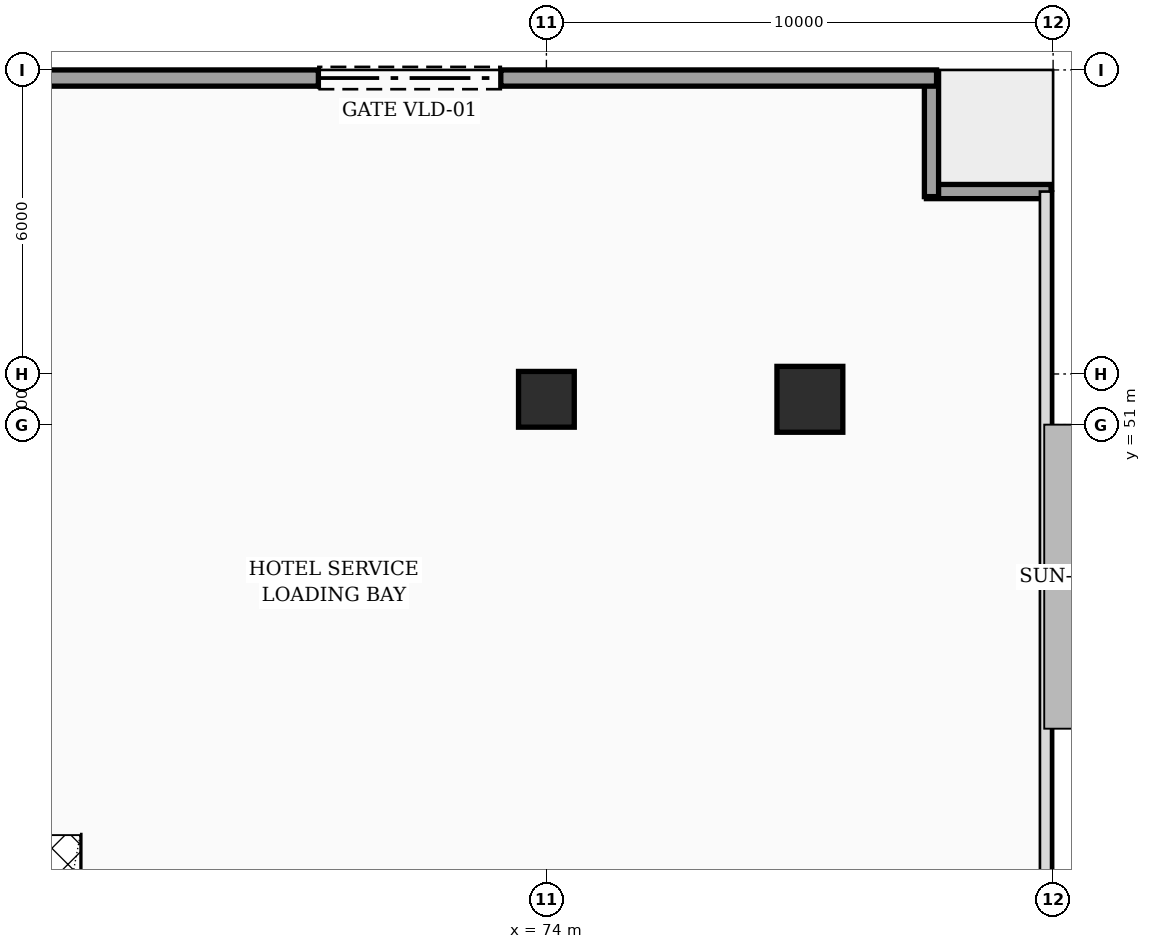
"""IFC4 building model, lengths in metres.
Left out: names, types, materials, properties, quantities, classifications, styles, units other than length and angle.
Written with IfcOpenShell. Run it as: python <this file> out.ifc"""

import sys

from ifc_helpers import new_model, si_unit, direction, frame, frame_2d, origin, origin_2d, place, context, subcontext, project, spatial, rectangle, hollow_rectangle, circle, extrude, element, fill, save


model = new_model("IFC4")
c1 = context("Model", 3, precision=1e-05, world=origin(), true_north=direction((0.0, 1.0)))
c2 = subcontext(c1, "Body", "Model", "MODEL_VIEW")
j1 = project(units=[si_unit("LENGTHUNIT", "METRE"), si_unit("PLANEANGLEUNIT", "RADIAN")], contexts=[c1])
p1 = place(None, origin())
s1 = spatial("IfcSite", under=j1, at=p1, CompositionType="ELEMENT")
p2 = place(p1, origin())
s2 = spatial("IfcBuilding", under=s1, at=p2, CompositionType="ELEMENT")
p3 = place(p2, origin())
s3 = spatial("IfcBuildingStorey", under=s2, at=p3, CompositionType="ELEMENT", Elevation=0.0)
p4 = place(p3, frame((74.0, 51.5, 0.0), z_axis=(0.0, 0.0, 1.0), x_axis=(1.0, 0.0, 0.0)))
e1 = element("IfcColumn", 1, at=p4, inside=s3, PredefinedType="COLUMN", context=c2, shape_type="SweptSolid", body=[
    extrude(hollow_rectangle(XDim=1.1, YDim=1.1, WallThickness=0.045, at=origin_2d()), origin(), (0.0, 0.0, 1.0), 5.68),
])
p5 = place(p3, frame((79.2, 51.5, 0.0), z_axis=(0.0, 0.0, 1.0), x_axis=(1.0, 0.0, 0.0)))
e2 = element("IfcColumn", 2, at=p5, inside=s3, PredefinedType="COLUMN", context=c2, shape_type="SweptSolid", body=[
    extrude(circle(Radius=0.65, at=origin_2d()), origin(), (0.0, 0.0, 1.0), 5.68),
])
for number, where, z_axis, x_axis in (
    (3, (83.96, 55.6, 0.0), (0.0, 0.0, 1.0), (-1.0, 0.0, 0.0)),
    (4, (81.6, 55.5, 0.0), (0.0, 0.0, 1.0), (0.0, 1.0, 0.0)),
):
    element("IfcWall", number, at=place(p3, frame(where, z_axis=z_axis, x_axis=x_axis)), inside=s3, PredefinedType="SOLIDWALL", context=c2, shape_type="SweptSolid", body=[
        extrude(rectangle(XDim=2.46, YDim=0.28, at=frame_2d((1.23, 0.0))), origin(), (0.0, 0.0, 1.0), 5.68),
    ])
p6 = place(p3, frame((2.3, 57.84, 0.0), z_axis=(0.0, 0.0, 1.0), x_axis=(1.0, 0.0, 0.0)))
e5 = element("IfcWall", 5, at=p6, inside=s3, PredefinedType="SOLIDWALL", context=c2, shape_type="SweptSolid", body=[
    extrude(rectangle(XDim=79.4, YDim=0.32, at=frame_2d((39.7, 0.0))), origin(), (0.0, 0.0, 1.0), 5.68),
])
p7 = place(p6, frame((48.0, 0.0, 0.0)))
e6 = element("IfcOpeningElement", 6, at=p7, cuts=e5, PredefinedType="OPENING", context=c2, shape_type="SweptSolid", body=[
    extrude(rectangle(XDim=2.2, YDim=2.5, at=frame_2d((1.1, 1.25))), frame((0.0, 0.17, 0.0), z_axis=(0.0, -1.0, 0.0), x_axis=(1.0, 0.0, 0.0)), (0.0, 0.0, 1.0), 0.34),
])
p8 = place(p6, frame((57.0, 0.0, 0.0)))
e7 = element("IfcOpeningElement", 7, at=p8, cuts=e5, PredefinedType="OPENING", context=c2, shape_type="SweptSolid", body=[
    extrude(rectangle(XDim=4.2, YDim=2.8, at=frame_2d((2.1, 1.4))), frame((0.0, 0.17, 0.0), z_axis=(0.0, -1.0, 0.0), x_axis=(1.0, 0.0, 0.0)), (0.0, 0.0, 1.0), 0.34),
])
p9 = place(p6, frame((67.2, 0.0, 0.0)))
e8 = element("IfcOpeningElement", 8, at=p9, cuts=e5, PredefinedType="OPENING", context=c2, shape_type="SweptSolid", body=[
    extrude(rectangle(XDim=3.6, YDim=4.2, at=frame_2d((1.8, 2.1))), frame((0.0, 0.17, 0.0), z_axis=(0.0, -1.0, 0.0), x_axis=(1.0, 0.0, 0.0)), (0.0, 0.0, 1.0), 0.34),
])
p10 = place(p9, origin())
e9 = element("IfcDoor", 9, at=p10, inside=s3, OperationType="ROLLINGUP", PredefinedType="GATE", context=c2, shape_type="SweptSolid", body=[
    extrude(rectangle(XDim=3.6, YDim=4.2, at=frame_2d((1.8, 2.1))), frame((0.0, 0.025, 0.0), z_axis=(0.0, -1.0, 0.0), x_axis=(1.0, 0.0, 0.0)), (0.0, 0.0, 1.0), 0.05),
])
fill(e8, e9)
save(model, sys.argv[1])
